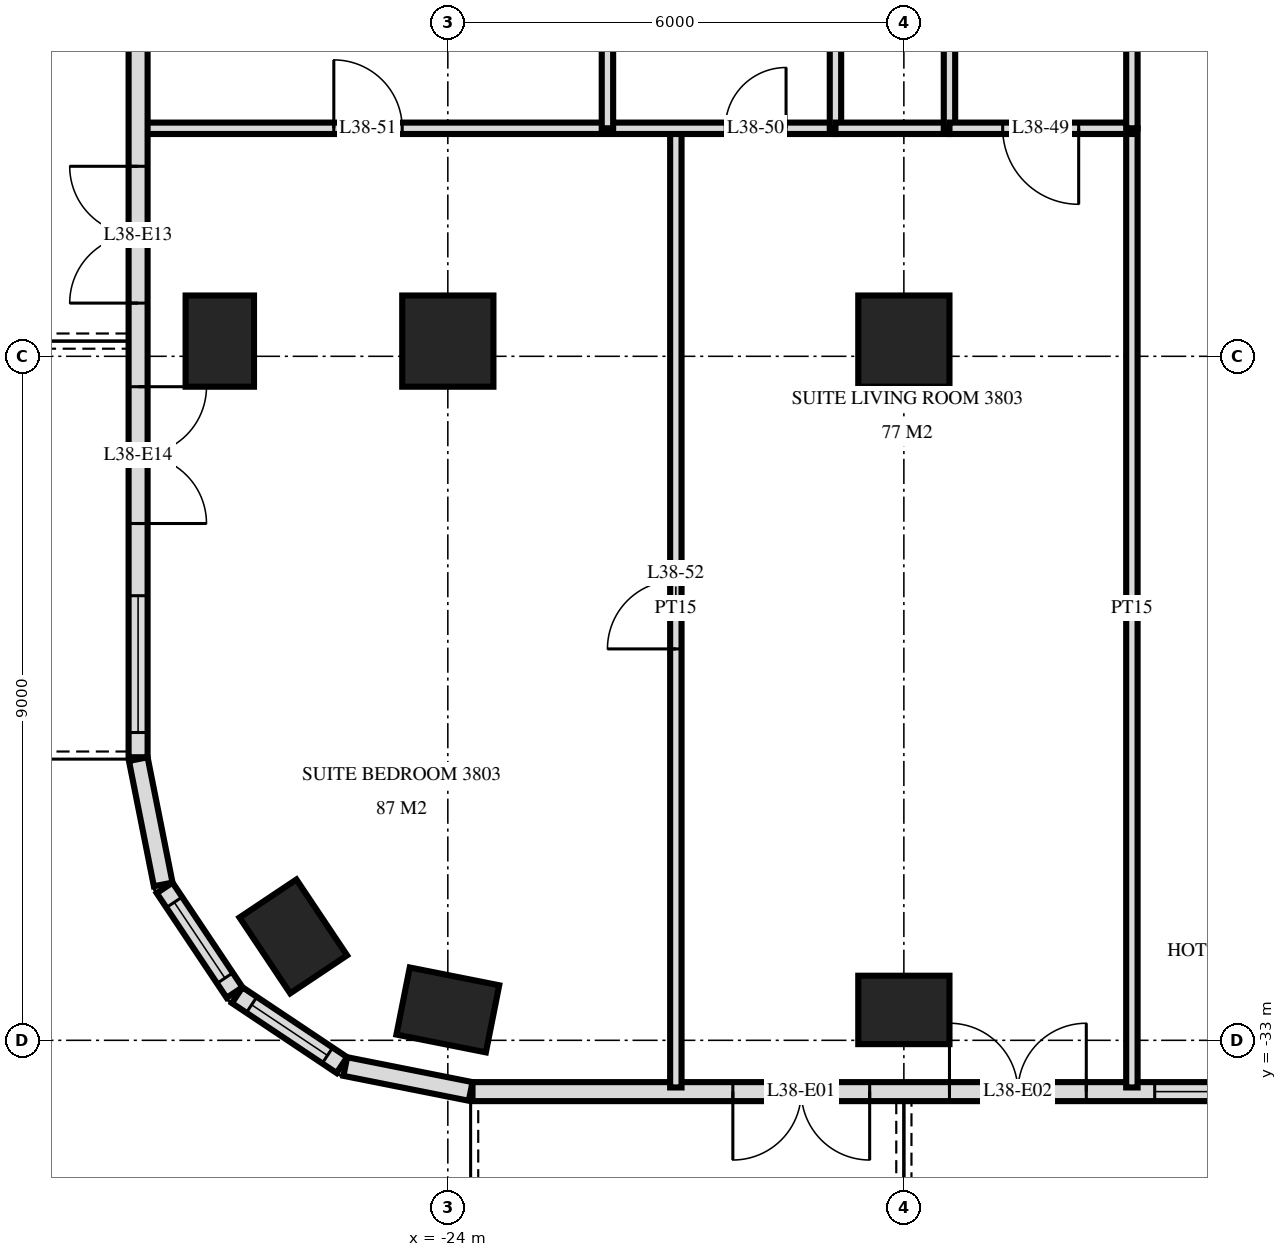
"""IFC4 building model, lengths in metres.
Left out: names, types, materials, properties, quantities, classifications, styles, units other than length and angle.
Written with IfcOpenShell. Run it as: python <this file> out.ifc"""

import sys

from ifc_helpers import new_model, si_unit, direction, frame, frame_2d, origin, origin_2d, place, context, subcontext, project, spatial, rectangle, extrude, element, fill, save


model = new_model("IFC4")
c1 = context("Model", 3, precision=1e-05, world=origin(), true_north=direction((0.0, 1.0)))
c2 = subcontext(c1, "Body", "Model", "MODEL_VIEW")
j1 = project(units=[si_unit("LENGTHUNIT", "METRE"), si_unit("PLANEANGLEUNIT", "RADIAN")], contexts=[c1])
p1 = place(None, origin())
s1 = spatial("IfcSite", under=j1, at=p1, CompositionType="ELEMENT")
p2 = place(p1, origin())
s2 = spatial("IfcBuilding", under=s1, at=p2, CompositionType="ELEMENT")
p3 = place(p2, frame((0.0, 0.0, 148.8)))
s3 = spatial("IfcBuildingStorey", under=s2, at=p3, CompositionType="ELEMENT", Elevation=148.8)
for number, where, z_axis, x_axis in (
    (1, (-27.0, -23.8, 0.0), (0.0, 0.0, 1.0), (0.0, 1.0, 0.0)),
    (2, (-26.033, -31.633, 0.0), (0.0, 0.0, 1.0), (-0.556, 0.831, 0.0)),
    (3, (-24.0, -32.6, 0.0), (0.0, 0.0, 1.0), (-0.981, 0.195, 0.0)),
):
    element("IfcColumn", number, at=place(p3, frame(where, z_axis=z_axis, x_axis=x_axis)), inside=s3, PredefinedType="COLUMN", context=c2, shape_type="SweptSolid", body=[
        extrude(rectangle(XDim=1.2, YDim=0.9, at=origin_2d()), origin(), (0.0, 0.0, 1.0), 3.6),
    ])
p4 = place(p3, frame((-24.0, -23.8, 0.0), z_axis=(0.0, 0.0, 1.0), x_axis=(1.0, 0.0, 0.0)))
e4 = element("IfcColumn", 4, at=p4, inside=s3, PredefinedType="COLUMN", context=c2, shape_type="SweptSolid", body=[
    extrude(rectangle(XDim=1.2, YDim=1.2, at=origin_2d()), origin(), (0.0, 0.0, 1.0), 3.6),
])
p5 = place(p3, frame((-18.0, -32.6, 0.0), z_axis=(0.0, 0.0, 1.0), x_axis=(1.0, 0.0, 0.0)))
e5 = element("IfcColumn", 5, at=p5, inside=s3, PredefinedType="COLUMN", context=c2, shape_type="SweptSolid", body=[
    extrude(rectangle(XDim=1.2, YDim=0.9, at=origin_2d()), origin(), (0.0, 0.0, 1.0), 3.6),
])
p6 = place(p3, frame((-18.0, -23.8, 0.0), z_axis=(0.0, 0.0, 1.0), x_axis=(1.0, 0.0, 0.0)))
e6 = element("IfcColumn", 6, at=p6, inside=s3, PredefinedType="COLUMN", context=c2, shape_type="SweptSolid", body=[
    extrude(rectangle(XDim=1.2, YDim=1.2, at=origin_2d()), origin(), (0.0, 0.0, 1.0), 3.6),
])
p7 = place(p3, frame((-28.075, -3.325, 0.0), z_axis=(0.0, 0.0, 1.0), x_axis=(0.0, -1.0, 0.0)))
e7 = element("IfcWall", 7, at=p7, inside=s3, PredefinedType="SOLIDWALL", context=c2, shape_type="SweptSolid", body=[
    extrude(rectangle(XDim=25.951, YDim=0.25, at=frame_2d((12.975, 0.0))), origin(), (0.0, 0.0, 1.0), 3.32),
])
p8 = place(p7, frame((7.275, 0.0, 0.0)))
e8 = element("IfcOpeningElement", 8, at=p8, cuts=e7, PredefinedType="OPENING", context=c2, shape_type="SweptSolid", body=[
    extrude(rectangle(XDim=1.8, YDim=2.4, at=frame_2d((0.9, 1.2))), frame((0.0, 0.135, 0.0), z_axis=(0.0, -1.0, 0.0), x_axis=(1.0, 0.0, 0.0)), (0.0, 0.0, 1.0), 0.27),
])
p9 = place(p7, frame((18.175, 0.0, 0.0)))
e9 = element("IfcOpeningElement", 9, at=p9, cuts=e7, PredefinedType="OPENING", context=c2, shape_type="SweptSolid", body=[
    extrude(rectangle(XDim=1.8, YDim=2.4, at=frame_2d((0.9, 1.2))), frame((0.0, 0.135, 0.0), z_axis=(0.0, -1.0, 0.0), x_axis=(1.0, 0.0, 0.0)), (0.0, 0.0, 1.0), 0.27),
])
p10 = place(p7, frame((21.075, 0.0, 0.0)))
e10 = element("IfcOpeningElement", 10, at=p10, cuts=e7, PredefinedType="OPENING", context=c2, shape_type="SweptSolid", body=[
    extrude(rectangle(XDim=1.8, YDim=2.4, at=frame_2d((0.9, 1.2))), frame((0.0, 0.135, 0.0), z_axis=(0.0, -1.0, 0.0), x_axis=(1.0, 0.0, 0.0)), (0.0, 0.0, 1.0), 0.27),
])
p11 = place(p7, frame((23.825, 0.0, 0.3)))
e11 = element("IfcOpeningElement", 11, at=p11, cuts=e7, PredefinedType="OPENING", context=c2, shape_type="SweptSolid", body=[
    extrude(rectangle(XDim=1.8, YDim=2.1, at=frame_2d((0.9, 1.05))), frame((0.0, 0.135, 0.0), z_axis=(0.0, -1.0, 0.0), x_axis=(1.0, 0.0, 0.0)), (0.0, 0.0, 1.0), 0.27),
])
p12 = place(p3, frame((-28.073, -29.3, 0.0), z_axis=(0.0, 0.0, 1.0), x_axis=(0.194999110559, -0.980803419081, 0.0)))
e12 = element("IfcWall", 12, at=p12, inside=s3, PredefinedType="SOLIDWALL", context=c2, shape_type="SweptSolid", body=[
    extrude(rectangle(XDim=1.681, YDim=0.25, at=frame_2d((0.841, 0.0))), origin(), (0.0, 0.0, 1.0), 3.32),
])
p13 = place(p3, frame((-27.726, -30.994, 0.0), z_axis=(0.0, 0.0, 1.0), x_axis=(0.55555029066, -0.831482937015, 0.0)))
e13 = element("IfcWall", 13, at=p13, inside=s3, PredefinedType="SOLIDWALL", context=c2, shape_type="SweptSolid", body=[
    extrude(rectangle(XDim=1.656, YDim=0.25, at=frame_2d((0.828, 0.0))), origin(), (0.0, 0.0, 1.0), 3.32),
])
p14 = place(p13, frame((0.228, 0.0, 0.9)))
e14 = element("IfcOpeningElement", 14, at=p14, cuts=e13, PredefinedType="OPENING", context=c2, shape_type="SweptSolid", body=[
    extrude(rectangle(XDim=1.2, YDim=1.5, at=frame_2d((0.6, 0.75))), frame((0.0, 0.135, 0.0), z_axis=(0.0, -1.0, 0.0), x_axis=(1.0, 0.0, 0.0)), (0.0, 0.0, 1.0), 0.27),
])
p15 = place(p3, frame((-26.771, -32.406, 0.0), z_axis=(0.0, 0.0, 1.0), x_axis=(0.831482937015, -0.55555029066, 0.0)))
e15 = element("IfcWall", 15, at=p15, inside=s3, PredefinedType="SOLIDWALL", context=c2, shape_type="SweptSolid", body=[
    extrude(rectangle(XDim=1.656, YDim=0.25, at=frame_2d((0.828, 0.0))), origin(), (0.0, 0.0, 1.0), 3.32),
])
p16 = place(p15, frame((0.228, 0.0, 0.9)))
e16 = element("IfcOpeningElement", 16, at=p16, cuts=e15, PredefinedType="OPENING", context=c2, shape_type="SweptSolid", body=[
    extrude(rectangle(XDim=1.2, YDim=1.5, at=frame_2d((0.6, 0.75))), frame((0.0, 0.135, 0.0), z_axis=(0.0, -1.0, 0.0), x_axis=(1.0, 0.0, 0.0)), (0.0, 0.0, 1.0), 0.27),
])
p17 = place(p3, frame((-25.349, -33.344, 0.0), z_axis=(0.0, 0.0, 1.0), x_axis=(0.980775640221, -0.19513878023, 0.0)))
e17 = element("IfcWall", 17, at=p17, inside=s3, PredefinedType="SOLIDWALL", context=c2, shape_type="SweptSolid", body=[
    extrude(rectangle(XDim=1.681, YDim=0.25, at=frame_2d((0.841, 0.0))), origin(), (0.0, 0.0, 1.0), 3.32),
])
p18 = place(p3, frame((-23.675, -33.675, 0.0), z_axis=(0.0, 0.0, 1.0), x_axis=(1.0, 0.0, 0.0)))
e18 = element("IfcWall", 18, at=p18, inside=s3, PredefinedType="SOLIDWALL", context=c2, shape_type="SweptSolid", body=[
    extrude(rectangle(XDim=47.351, YDim=0.25, at=frame_2d((23.675, 0.0))), origin(), (0.0, 0.0, 1.0), 3.32),
])
p19 = place(p18, frame((3.425, 0.0, 0.0)))
e19 = element("IfcOpeningElement", 19, at=p19, cuts=e18, PredefinedType="OPENING", context=c2, shape_type="SweptSolid", body=[
    extrude(rectangle(XDim=1.8, YDim=2.4, at=frame_2d((0.9, 1.2))), frame((0.0, 0.135, 0.0), z_axis=(0.0, -1.0, 0.0), x_axis=(1.0, 0.0, 0.0)), (0.0, 0.0, 1.0), 0.27),
])
p20 = place(p18, frame((6.275, 0.0, 0.0)))
e20 = element("IfcOpeningElement", 20, at=p20, cuts=e18, PredefinedType="OPENING", context=c2, shape_type="SweptSolid", body=[
    extrude(rectangle(XDim=1.8, YDim=2.4, at=frame_2d((0.9, 1.2))), frame((0.0, 0.135, 0.0), z_axis=(0.0, -1.0, 0.0), x_axis=(1.0, 0.0, 0.0)), (0.0, 0.0, 1.0), 0.27),
])
p21 = place(p18, frame((8.975, 0.0, 0.3)))
e21 = element("IfcOpeningElement", 21, at=p21, cuts=e18, PredefinedType="OPENING", context=c2, shape_type="SweptSolid", body=[
    extrude(rectangle(XDim=2.4, YDim=2.1, at=frame_2d((1.2, 1.05))), frame((0.0, 0.135, 0.0), z_axis=(0.0, -1.0, 0.0), x_axis=(1.0, 0.0, 0.0)), (0.0, 0.0, 1.0), 0.27),
])
p22 = place(p18, frame((12.275, 0.0, 0.0)))
e22 = element("IfcOpeningElement", 22, at=p22, cuts=e18, PredefinedType="OPENING", context=c2, shape_type="SweptSolid", body=[
    extrude(rectangle(XDim=1.8, YDim=2.4, at=frame_2d((0.9, 1.2))), frame((0.0, 0.135, 0.0), z_axis=(0.0, -1.0, 0.0), x_axis=(1.0, 0.0, 0.0)), (0.0, 0.0, 1.0), 0.27),
])
p23 = place(p18, frame((14.975, 0.0, 0.3)))
e23 = element("IfcOpeningElement", 23, at=p23, cuts=e18, PredefinedType="OPENING", context=c2, shape_type="SweptSolid", body=[
    extrude(rectangle(XDim=2.4, YDim=2.1, at=frame_2d((1.2, 1.05))), frame((0.0, 0.135, 0.0), z_axis=(0.0, -1.0, 0.0), x_axis=(1.0, 0.0, 0.0)), (0.0, 0.0, 1.0), 0.27),
])
p24 = place(p18, frame((21.275, 0.0, 0.0)))
e24 = element("IfcOpeningElement", 24, at=p24, cuts=e18, PredefinedType="OPENING", context=c2, shape_type="SweptSolid", body=[
    extrude(rectangle(XDim=1.8, YDim=2.4, at=frame_2d((0.9, 1.2))), frame((0.0, 0.135, 0.0), z_axis=(0.0, -1.0, 0.0), x_axis=(1.0, 0.0, 0.0)), (0.0, 0.0, 1.0), 0.27),
])
p25 = place(p18, frame((24.275, 0.0, 0.0)))
e25 = element("IfcOpeningElement", 25, at=p25, cuts=e18, PredefinedType="OPENING", context=c2, shape_type="SweptSolid", body=[
    extrude(rectangle(XDim=1.8, YDim=2.4, at=frame_2d((0.9, 1.2))), frame((0.0, 0.135, 0.0), z_axis=(0.0, -1.0, 0.0), x_axis=(1.0, 0.0, 0.0)), (0.0, 0.0, 1.0), 0.27),
])
p26 = place(p18, frame((30.275, 0.0, 0.0)))
e26 = element("IfcOpeningElement", 26, at=p26, cuts=e18, PredefinedType="OPENING", context=c2, shape_type="SweptSolid", body=[
    extrude(rectangle(XDim=1.8, YDim=2.4, at=frame_2d((0.9, 1.2))), frame((0.0, 0.135, 0.0), z_axis=(0.0, -1.0, 0.0), x_axis=(1.0, 0.0, 0.0)), (0.0, 0.0, 1.0), 0.27),
])
p27 = place(p18, frame((32.975, 0.0, 0.3)))
e27 = element("IfcOpeningElement", 27, at=p27, cuts=e18, PredefinedType="OPENING", context=c2, shape_type="SweptSolid", body=[
    extrude(rectangle(XDim=2.4, YDim=2.1, at=frame_2d((1.2, 1.05))), frame((0.0, 0.135, 0.0), z_axis=(0.0, -1.0, 0.0), x_axis=(1.0, 0.0, 0.0)), (0.0, 0.0, 1.0), 0.27),
])
p28 = place(p18, frame((36.275, 0.0, 0.0)))
e28 = element("IfcOpeningElement", 28, at=p28, cuts=e18, PredefinedType="OPENING", context=c2, shape_type="SweptSolid", body=[
    extrude(rectangle(XDim=1.8, YDim=2.4, at=frame_2d((0.9, 1.2))), frame((0.0, 0.135, 0.0), z_axis=(0.0, -1.0, 0.0), x_axis=(1.0, 0.0, 0.0)), (0.0, 0.0, 1.0), 0.27),
])
p29 = place(p18, frame((38.975, 0.0, 0.3)))
e29 = element("IfcOpeningElement", 29, at=p29, cuts=e18, PredefinedType="OPENING", context=c2, shape_type="SweptSolid", body=[
    extrude(rectangle(XDim=2.4, YDim=2.1, at=frame_2d((1.2, 1.05))), frame((0.0, 0.135, 0.0), z_axis=(0.0, -1.0, 0.0), x_axis=(1.0, 0.0, 0.0)), (0.0, 0.0, 1.0), 0.27),
])
p30 = place(p18, frame((42.275, 0.0, 0.0)))
e30 = element("IfcOpeningElement", 30, at=p30, cuts=e18, PredefinedType="OPENING", context=c2, shape_type="SweptSolid", body=[
    extrude(rectangle(XDim=1.8, YDim=2.4, at=frame_2d((0.9, 1.2))), frame((0.0, 0.135, 0.0), z_axis=(0.0, -1.0, 0.0), x_axis=(1.0, 0.0, 0.0)), (0.0, 0.0, 1.0), 0.27),
])
p31 = place(p18, frame((45.125, 0.0, 0.3)))
e31 = element("IfcOpeningElement", 31, at=p31, cuts=e18, PredefinedType="OPENING", context=c2, shape_type="SweptSolid", body=[
    extrude(rectangle(XDim=1.8, YDim=2.1, at=frame_2d((0.9, 1.05))), frame((0.0, 0.135, 0.0), z_axis=(0.0, -1.0, 0.0), x_axis=(1.0, 0.0, 0.0)), (0.0, 0.0, 1.0), 0.27),
])
p32 = place(p3, frame((-15.0, -21.0, 0.0), z_axis=(0.0, 0.0, 1.0), x_axis=(0.0, 1.0, 0.0)))
e32 = element("IfcWall", 32, at=p32, inside=s3, PredefinedType="PARTITIONING", context=c2, shape_type="SweptSolid", body=[
    extrude(rectangle(XDim=4.2, YDim=0.15, at=frame_2d((2.1, 0.0))), origin(), (0.0, 0.0, 1.0), 3.32),
])
p33 = place(p3, frame((-15.0, -33.62, 0.0), z_axis=(0.0, 0.0, 1.0), x_axis=(0.0, 1.0, 0.0)))
e33 = element("IfcWall", 33, at=p33, inside=s3, PredefinedType="PARTITIONING", context=c2, shape_type="SweptSolid", body=[
    extrude(rectangle(XDim=12.62, YDim=0.15, at=frame_2d((6.31, 0.0))), origin(), (0.0, 0.0, 1.0), 3.32),
])
p34 = place(p3, frame((-17.4, -21.0, 0.0), z_axis=(0.0, 0.0, 1.0), x_axis=(0.0, 1.0, 0.0)))
e34 = element("IfcWall", 34, at=p34, inside=s3, PredefinedType="PARTITIONING", context=c2, shape_type="SweptSolid", body=[
    extrude(rectangle(XDim=4.2, YDim=0.15, at=frame_2d((2.1, 0.0))), origin(), (0.0, 0.0, 1.0), 3.32),
])
p35 = place(p34, frame((1.6, 0.0, 0.0)))
e35 = element("IfcOpeningElement", 35, at=p35, cuts=e34, PredefinedType="OPENING", context=c2, shape_type="SweptSolid", body=[
    extrude(rectangle(XDim=1.0, YDim=2.1, at=frame_2d((0.5, 1.05))), frame((0.0, 0.085, 0.0), z_axis=(0.0, -1.0, 0.0), x_axis=(1.0, 0.0, 0.0)), (0.0, 0.0, 1.0), 0.17),
])
p36 = place(p3, frame((-18.9, -21.0, 0.0), z_axis=(0.0, 0.0, 1.0), x_axis=(0.0, 1.0, 0.0)))
e36 = element("IfcWall", 36, at=p36, inside=s3, PredefinedType="PLUMBINGWALL", context=c2, shape_type="SweptSolid", body=[
    extrude(rectangle(XDim=4.2, YDim=0.15, at=frame_2d((2.1, 0.0))), origin(), (0.0, 0.0, 1.0), 3.32),
])
p37 = place(p3, frame((-21.0, -33.62, 0.0), z_axis=(0.0, 0.0, 1.0), x_axis=(0.0, 1.0, 0.0)))
e37 = element("IfcWall", 37, at=p37, inside=s3, PredefinedType="PARTITIONING", context=c2, shape_type="SweptSolid", body=[
    extrude(rectangle(XDim=12.62, YDim=0.15, at=frame_2d((6.31, 0.0))), origin(), (0.0, 0.0, 1.0), 3.32),
])
p38 = place(p37, frame((5.77, 0.0, 0.0)))
e38 = element("IfcOpeningElement", 38, at=p38, cuts=e37, PredefinedType="OPENING", context=c2, shape_type="SweptSolid", body=[
    extrude(rectangle(XDim=0.9, YDim=2.1, at=frame_2d((0.45, 1.05))), frame((0.0, 0.085, 0.0), z_axis=(0.0, -1.0, 0.0), x_axis=(1.0, 0.0, 0.0)), (0.0, 0.0, 1.0), 0.17),
])
p39 = place(p3, frame((-21.9, -21.0, 0.0), z_axis=(0.0, 0.0, 1.0), x_axis=(0.0, 1.0, 0.0)))
e39 = element("IfcWall", 39, at=p39, inside=s3, PredefinedType="PARTITIONING", context=c2, shape_type="SweptSolid", body=[
    extrude(rectangle(XDim=4.2, YDim=0.15, at=frame_2d((2.1, 0.0))), origin(), (0.0, 0.0, 1.0), 3.32),
])
p40 = place(p3, frame((-17.4, -21.0, 0.0), z_axis=(0.0, 0.0, 1.0), x_axis=(1.0, 0.0, 0.0)))
e40 = element("IfcWall", 40, at=p40, inside=s3, PredefinedType="PARTITIONING", context=c2, shape_type="SweptSolid", body=[
    extrude(rectangle(XDim=2.4, YDim=0.15, at=frame_2d((1.2, 0.0))), origin(), (0.0, 0.0, 1.0), 3.32),
])
p41 = place(p40, frame((0.7, 0.0, 0.0)))
e41 = element("IfcOpeningElement", 41, at=p41, cuts=e40, PredefinedType="OPENING", context=c2, shape_type="SweptSolid", body=[
    extrude(rectangle(XDim=1.0, YDim=2.1, at=frame_2d((0.5, 1.05))), frame((0.0, 0.085, 0.0), z_axis=(0.0, -1.0, 0.0), x_axis=(1.0, 0.0, 0.0)), (0.0, 0.0, 1.0), 0.17),
])
p42 = place(p3, frame((-28.02, -21.0, 0.0), z_axis=(0.0, 0.0, 1.0), x_axis=(1.0, 0.0, 0.0)))
e42 = element("IfcWall", 42, at=p42, inside=s3, PredefinedType="PARTITIONING", context=c2, shape_type="SweptSolid", body=[
    extrude(rectangle(XDim=9.12, YDim=0.15, at=frame_2d((4.56, 0.0))), origin(), (0.0, 0.0, 1.0), 3.32),
])
p43 = place(p42, frame((7.67, 0.0, 0.0)))
e43 = element("IfcOpeningElement", 43, at=p43, cuts=e42, PredefinedType="OPENING", context=c2, shape_type="SweptSolid", body=[
    extrude(rectangle(XDim=0.8, YDim=2.1, at=frame_2d((0.4, 1.05))), frame((0.0, 0.085, 0.0), z_axis=(0.0, -1.0, 0.0), x_axis=(1.0, 0.0, 0.0)), (0.0, 0.0, 1.0), 0.17),
])
p44 = place(p42, frame((2.52, 0.0, 0.0)))
e44 = element("IfcOpeningElement", 44, at=p44, cuts=e42, PredefinedType="OPENING", context=c2, shape_type="SweptSolid", body=[
    extrude(rectangle(XDim=0.9, YDim=2.1, at=frame_2d((0.45, 1.05))), frame((0.0, 0.085, 0.0), z_axis=(0.0, -1.0, 0.0), x_axis=(1.0, 0.0, 0.0)), (0.0, 0.0, 1.0), 0.17),
])
p45 = place(p3, frame((-18.9, -21.0, 0.0), z_axis=(0.0, 0.0, 1.0), x_axis=(1.0, 0.0, 0.0)))
e45 = element("IfcWall", 45, at=p45, inside=s3, PredefinedType="PLUMBINGWALL", context=c2, shape_type="SweptSolid", body=[
    extrude(rectangle(XDim=1.5, YDim=0.15, at=frame_2d((0.75, 0.0))), origin(), (0.0, 0.0, 1.0), 3.32),
])
p46 = place(p14, origin())
e46 = element("IfcWindow", 46, at=p46, inside=s3, PartitioningType="SINGLE_PANEL", PredefinedType="WINDOW", context=c2, shape_type="SweptSolid", body=[
    extrude(rectangle(XDim=1.2, YDim=1.5, at=frame_2d((0.6, 0.75))), frame((0.0, 0.03, 0.0), z_axis=(0.0, -1.0, 0.0), x_axis=(1.0, 0.0, 0.0)), (0.0, 0.0, 1.0), 0.06),
])
fill(e14, e46)
p47 = place(p16, origin())
e47 = element("IfcWindow", 47, at=p47, inside=s3, PartitioningType="SINGLE_PANEL", PredefinedType="WINDOW", context=c2, shape_type="SweptSolid", body=[
    extrude(rectangle(XDim=1.2, YDim=1.5, at=frame_2d((0.6, 0.75))), frame((0.0, 0.03, 0.0), z_axis=(0.0, -1.0, 0.0), x_axis=(1.0, 0.0, 0.0)), (0.0, 0.0, 1.0), 0.06),
])
fill(e16, e47)
p48 = place(p19, frame((0.9, 0.0, 0.0), z_axis=(0.0, 0.0, 1.0), x_axis=(-1.0, 0.0, 0.0)))
e48 = element("IfcDoor", 48, at=p48, inside=s3, OperationType="DOUBLE_DOOR_SINGLE_SWING", PredefinedType="DOOR", context=c2, shape_type="SweptSolid", body=[
    extrude(rectangle(XDim=1.8, YDim=2.4, at=frame_2d((0.0, 1.2))), frame((0.0, -0.025, 0.0), z_axis=(0.0, 1.0, 0.0), x_axis=(-1.0, 0.0, 0.0)), (0.0, 0.0, 1.0), 0.05),
])
fill(e19, e48)
p49 = place(p20, origin())
e49 = element("IfcDoor", 49, at=p49, inside=s3, OperationType="DOUBLE_DOOR_SINGLE_SWING", PredefinedType="DOOR", context=c2, shape_type="SweptSolid", body=[
    extrude(rectangle(XDim=1.8, YDim=2.4, at=frame_2d((0.9, 1.2))), frame((0.0, 0.025, 0.0), z_axis=(0.0, -1.0, 0.0), x_axis=(1.0, 0.0, 0.0)), (0.0, 0.0, 1.0), 0.05),
])
fill(e20, e49)
p50 = place(p21, origin())
e50 = element("IfcWindow", 50, at=p50, inside=s3, PartitioningType="SINGLE_PANEL", PredefinedType="WINDOW", context=c2, shape_type="SweptSolid", body=[
    extrude(rectangle(XDim=2.4, YDim=2.1, at=frame_2d((1.2, 1.05))), frame((0.0, 0.03, 0.0), z_axis=(0.0, -1.0, 0.0), x_axis=(1.0, 0.0, 0.0)), (0.0, 0.0, 1.0), 0.06),
])
fill(e21, e50)
p51 = place(p9, frame((0.9, 0.0, 0.0), z_axis=(0.0, 0.0, 1.0), x_axis=(-1.0, 0.0, 0.0)))
e51 = element("IfcDoor", 51, at=p51, inside=s3, OperationType="DOUBLE_DOOR_SINGLE_SWING", PredefinedType="DOOR", context=c2, shape_type="SweptSolid", body=[
    extrude(rectangle(XDim=1.8, YDim=2.4, at=frame_2d((0.0, 1.2))), frame((0.0, -0.025, 0.0), z_axis=(0.0, 1.0, 0.0), x_axis=(-1.0, 0.0, 0.0)), (0.0, 0.0, 1.0), 0.05),
])
fill(e9, e51)
p52 = place(p10, origin())
e52 = element("IfcDoor", 52, at=p52, inside=s3, OperationType="DOUBLE_DOOR_SINGLE_SWING", PredefinedType="DOOR", context=c2, shape_type="SweptSolid", body=[
    extrude(rectangle(XDim=1.8, YDim=2.4, at=frame_2d((0.9, 1.2))), frame((0.0, 0.025, 0.0), z_axis=(0.0, -1.0, 0.0), x_axis=(1.0, 0.0, 0.0)), (0.0, 0.0, 1.0), 0.05),
])
fill(e10, e52)
p53 = place(p11, origin())
e53 = element("IfcWindow", 53, at=p53, inside=s3, PartitioningType="SINGLE_PANEL", PredefinedType="WINDOW", context=c2, shape_type="SweptSolid", body=[
    extrude(rectangle(XDim=1.8, YDim=2.1, at=frame_2d((0.9, 1.05))), frame((0.0, 0.03, 0.0), z_axis=(0.0, -1.0, 0.0), x_axis=(1.0, 0.0, 0.0)), (0.0, 0.0, 1.0), 0.06),
])
fill(e11, e53)
p54 = place(p41, frame((0.5, 0.0, 0.0), z_axis=(0.0, 0.0, 1.0), x_axis=(-1.0, 0.0, 0.0)))
e54 = element("IfcDoor", 54, at=p54, inside=s3, OperationType="SINGLE_SWING_RIGHT", PredefinedType="DOOR", context=c2, shape_type="SweptSolid", body=[
    extrude(rectangle(XDim=1.0, YDim=2.1, at=frame_2d((0.0, 1.05))), frame((0.0, -0.025, 0.0), z_axis=(0.0, 1.0, 0.0), x_axis=(-1.0, 0.0, 0.0)), (0.0, 0.0, 1.0), 0.05),
])
fill(e41, e54)
p55 = place(p43, origin())
e55 = element("IfcDoor", 55, at=p55, inside=s3, OperationType="SINGLE_SWING_LEFT", PredefinedType="DOOR", context=c2, shape_type="SweptSolid", body=[
    extrude(rectangle(XDim=0.8, YDim=2.1, at=frame_2d((0.4, 1.05))), frame((0.0, 0.025, 0.0), z_axis=(0.0, -1.0, 0.0), x_axis=(1.0, 0.0, 0.0)), (0.0, 0.0, 1.0), 0.05),
])
fill(e43, e55)
p56 = place(p44, origin())
e56 = element("IfcDoor", 56, at=p56, inside=s3, OperationType="SINGLE_SWING_RIGHT", PredefinedType="DOOR", context=c2, shape_type="SweptSolid", body=[
    extrude(rectangle(XDim=0.9, YDim=2.1, at=frame_2d((0.45, 1.05))), frame((0.0, 0.025, 0.0), z_axis=(0.0, -1.0, 0.0), x_axis=(1.0, 0.0, 0.0)), (0.0, 0.0, 1.0), 0.05),
])
fill(e44, e56)
p57 = place(p38, origin())
e57 = element("IfcDoor", 57, at=p57, inside=s3, OperationType="SINGLE_SWING_RIGHT", PredefinedType="DOOR", context=c2, shape_type="SweptSolid", body=[
    extrude(rectangle(XDim=0.9, YDim=2.1, at=frame_2d((0.45, 1.05))), frame((0.0, 0.025, 0.0), z_axis=(0.0, -1.0, 0.0), x_axis=(1.0, 0.0, 0.0)), (0.0, 0.0, 1.0), 0.05),
])
fill(e38, e57)
save(model, sys.argv[1])
